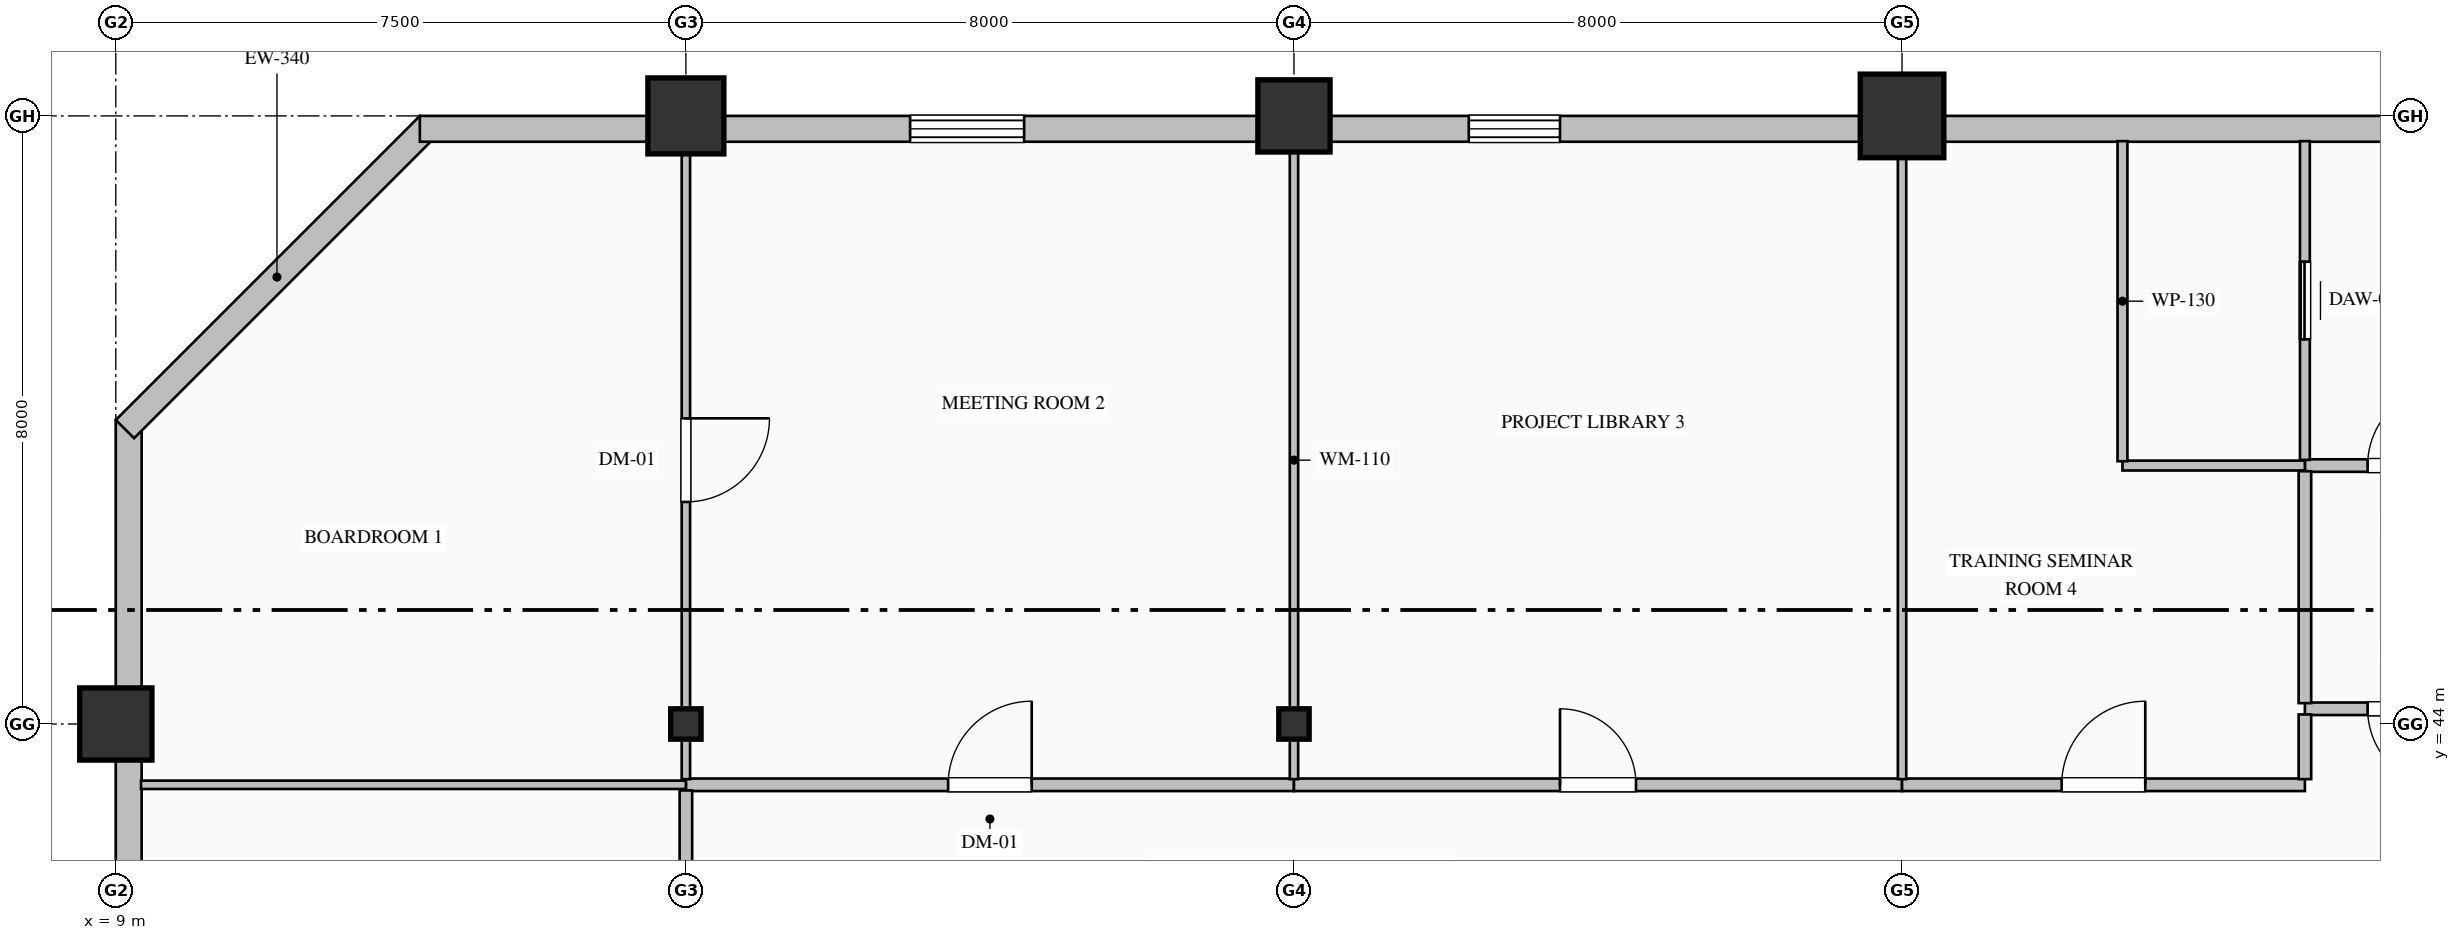
"""IFC4 building model, lengths in metres.
Left out: names, types, materials, properties, quantities, classifications, styles, units other than length and angle.
Written with IfcOpenShell. Run it as: python <this file> out.ifc"""

import sys

from ifc_helpers import new_model, si_unit, direction, frame, frame_2d, origin, origin_2d, place, context, subcontext, project, spatial, rectangle, hollow_rectangle, hollow_circle, i_section, extrude, element, fill, save


model = new_model("IFC4")
c1 = context("Model", 3, precision=1e-05, world=origin(), true_north=direction((0.0, 1.0)))
c2 = subcontext(c1, "Body", "Model", "MODEL_VIEW")
j1 = project(units=[si_unit("LENGTHUNIT", "METRE"), si_unit("PLANEANGLEUNIT", "RADIAN")], contexts=[c1])
p1 = place(None, origin())
s1 = spatial("IfcSite", under=j1, at=p1, CompositionType="ELEMENT")
p2 = place(p1, origin())
s2 = spatial("IfcBuilding", under=s1, at=p2, CompositionType="ELEMENT")
p3 = place(p2, frame((0.0, 0.0, 139.0)))
s3 = spatial("IfcBuildingStorey", under=s2, at=p3, CompositionType="ELEMENT", Elevation=139.0)
p4 = place(p3, frame((9.0, 44.0, 0.0), z_axis=(0.0, 0.0, 1.0), x_axis=(1.0, 0.0, 0.0)))
e1 = element("IfcColumn", 1, at=p4, inside=s3, PredefinedType="COLUMN", context=c2, shape_type="SweptSolid", body=[
    extrude(hollow_rectangle(XDim=0.95, YDim=0.95, WallThickness=0.036, at=origin_2d()), origin(), (0.0, 0.0, 1.0), 4.0),
])
p5 = place(p3, frame((16.5, 44.0, 0.0), z_axis=(0.0, 0.0, 1.0), x_axis=(1.0, 0.0, 0.0)))
e2 = element("IfcColumn", 2, at=p5, inside=s3, PredefinedType="COLUMN", context=c2, shape_type="SweptSolid", body=[
    extrude(i_section(OverallWidth=0.4, OverallDepth=0.4, WebThickness=0.013, FlangeThickness=0.021, FilletRadius=0.022, at=origin_2d()), origin(), (0.0, 0.0, 1.0), 4.0),
])
p6 = place(p3, frame((16.5, 52.0, 0.0), z_axis=(0.0, 0.0, 1.0), x_axis=(1.0, 0.0, 0.0)))
e3 = element("IfcColumn", 3, at=p6, inside=s3, PredefinedType="COLUMN", context=c2, shape_type="SweptSolid", body=[
    extrude(hollow_circle(Radius=0.5, WallThickness=0.036, at=origin_2d()), origin(), (0.0, 0.0, 1.0), 4.0),
])
p7 = place(p3, frame((24.5, 44.0, 0.0), z_axis=(0.0, 0.0, 1.0), x_axis=(1.0, 0.0, 0.0)))
e4 = element("IfcColumn", 4, at=p7, inside=s3, PredefinedType="COLUMN", context=c2, shape_type="SweptSolid", body=[
    extrude(i_section(OverallWidth=0.4, OverallDepth=0.4, WebThickness=0.013, FlangeThickness=0.021, FilletRadius=0.022, at=origin_2d()), origin(), (0.0, 0.0, 1.0), 4.0),
])
p8 = place(p3, frame((24.5, 52.0, 0.0), z_axis=(0.0, 0.0, 1.0), x_axis=(1.0, 0.0, 0.0)))
e5 = element("IfcColumn", 5, at=p8, inside=s3, PredefinedType="COLUMN", context=c2, shape_type="SweptSolid", body=[
    extrude(hollow_rectangle(XDim=0.95, YDim=0.95, WallThickness=0.036, at=origin_2d()), origin(), (0.0, 0.0, 1.0), 4.0),
])
p9 = place(p3, frame((32.5, 52.0, 0.0), z_axis=(0.0, 0.0, 1.0), x_axis=(1.0, 0.0, 0.0)))
e6 = element("IfcColumn", 6, at=p9, inside=s3, PredefinedType="COLUMN", context=c2, shape_type="SweptSolid", body=[
    extrude(hollow_rectangle(XDim=1.1, YDim=1.1, WallThickness=0.04, at=origin_2d()), origin(), (0.0, 0.0, 1.0), 4.0),
])
p10 = place(p3, frame((9.17, 32.0, 0.0), z_axis=(0.0, 0.0, 1.0), x_axis=(0.0, 1.0, 0.0)))
e7 = element("IfcWall", 7, at=p10, inside=s3, PredefinedType="SOLIDWALL", context=c2, shape_type="SweptSolid", body=[
    extrude(rectangle(XDim=16.0, YDim=0.34, at=frame_2d((8.0, 0.0))), origin(), (0.0, 0.0, 1.0), 3.265),
])
p11 = place(p10, frame((6.375, 0.0, 0.85)))
e8 = element("IfcOpeningElement", 8, at=p11, cuts=e7, PredefinedType="OPENING", context=c2, shape_type="SweptSolid", body=[
    extrude(rectangle(XDim=1.65, YDim=1.95, at=frame_2d((0.825, 0.975))), frame((0.0, 0.18, 0.0), z_axis=(0.0, -1.0, 0.0), x_axis=(1.0, 0.0, 0.0)), (0.0, 0.0, 1.0), 0.36),
])
p12 = place(p3, frame((9.12, 47.88, 0.0), z_axis=(0.0, 0.0, 1.0), x_axis=(0.707106781187, 0.707106781187, 0.0)))
e9 = element("IfcWall", 9, at=p12, inside=s3, PredefinedType="SOLIDWALL", context=c2, shape_type="SweptSolid", body=[
    extrude(rectangle(XDim=5.657, YDim=0.34, at=frame_2d((2.828, 0.0))), origin(), (0.0, 0.0, 1.0), 3.765),
])
p13 = place(p3, frame((13.0, 51.83, 0.0), z_axis=(0.0, 0.0, 1.0), x_axis=(1.0, 0.0, 0.0)))
e10 = element("IfcWall", 10, at=p13, inside=s3, PredefinedType="SOLIDWALL", context=c2, shape_type="SweptSolid", body=[
    extrude(rectangle(XDim=27.52, YDim=0.34, at=frame_2d((13.76, 0.0))), origin(), (0.0, 0.0, 1.0), 3.265),
])
p14 = place(p13, frame((6.45, 0.0, 0.85)))
e11 = element("IfcOpeningElement", 11, at=p14, cuts=e10, PredefinedType="OPENING", context=c2, shape_type="SweptSolid", body=[
    extrude(rectangle(XDim=1.5, YDim=1.95, at=frame_2d((0.75, 0.975))), frame((0.0, 0.18, 0.0), z_axis=(0.0, -1.0, 0.0), x_axis=(1.0, 0.0, 0.0)), (0.0, 0.0, 1.0), 0.36),
])
p15 = place(p13, frame((13.8, 0.0, 0.7)))
e12 = element("IfcOpeningElement", 12, at=p15, cuts=e10, PredefinedType="OPENING", context=c2, shape_type="SweptSolid", body=[
    extrude(rectangle(XDim=1.2, YDim=1.85, at=frame_2d((0.6, 0.925))), frame((0.0, 0.18, 0.0), z_axis=(0.0, -1.0, 0.0), x_axis=(1.0, 0.0, 0.0)), (0.0, 0.0, 1.0), 0.36),
])
p16 = place(p3, frame((37.8, 47.4, 0.0), z_axis=(0.0, 0.0, 1.0), x_axis=(1.0, 0.0, 0.0)))
e13 = element("IfcWall", 13, at=p16, inside=s3, PredefinedType="PARTITIONING", context=c2, shape_type="SweptSolid", body=[
    extrude(rectangle(XDim=2.7, YDim=0.165, at=frame_2d((1.35, 0.0))), origin(), (0.0, 0.0, 1.0), 3.765),
])
p17 = place(p16, frame((0.825, 0.0, 0.0)))
e14 = element("IfcOpeningElement", 14, at=p17, cuts=e13, PredefinedType="OPENING", context=c2, shape_type="SweptSolid", body=[
    extrude(rectangle(XDim=1.05, YDim=2.15, at=frame_2d((0.525, 1.075))), frame((0.0, 0.093, 0.0), z_axis=(0.0, -1.0, 0.0), x_axis=(1.0, 0.0, 0.0)), (0.0, 0.0, 1.0), 0.185),
])
p18 = place(p3, frame((40.5, 44.2, 0.0), z_axis=(0.0, 0.0, 1.0), x_axis=(-1.0, 0.0, 0.0)))
e15 = element("IfcWall", 15, at=p18, inside=s3, PredefinedType="PARTITIONING", context=c2, shape_type="SweptSolid", body=[
    extrude(rectangle(XDim=2.7, YDim=0.165, at=frame_2d((1.35, 0.0))), origin(), (0.0, 0.0, 1.0), 3.765),
])
p19 = place(p18, frame((0.825, 0.0, 0.0)))
e16 = element("IfcOpeningElement", 16, at=p19, cuts=e15, PredefinedType="OPENING", context=c2, shape_type="SweptSolid", body=[
    extrude(rectangle(XDim=1.05, YDim=2.15, at=frame_2d((0.525, 1.075))), frame((0.0, 0.093, 0.0), z_axis=(0.0, -1.0, 0.0), x_axis=(1.0, 0.0, 0.0)), (0.0, 0.0, 1.0), 0.185),
])
p20 = place(p3, frame((37.8, 44.274, 0.0), z_axis=(0.0, 0.0, 1.0), x_axis=(0.0, 1.0, 0.0)))
e17 = element("IfcWall", 17, at=p20, inside=s3, PredefinedType="PARTITIONING", context=c2, shape_type="SweptSolid", body=[
    extrude(rectangle(XDim=3.051, YDim=0.165, at=frame_2d((1.525, 0.0))), origin(), (0.0, 0.0, 1.0), 3.765),
])
p21 = place(p3, frame((37.8, 47.475, 0.0), z_axis=(0.0, 0.0, 1.0), x_axis=(0.0, 1.0, 0.0)))
e18 = element("IfcWall", 18, at=p21, inside=s3, PredefinedType="PARTITIONING", context=c2, shape_type="SweptSolid", body=[
    extrude(rectangle(XDim=4.193, YDim=0.13, at=frame_2d((2.097, 0.0))), origin(), (0.0, 0.0, 1.0), 3.765),
])
p22 = place(p21, frame((1.587, 0.0, 0.0)))
e19 = element("IfcOpeningElement", 19, at=p22, cuts=e18, PredefinedType="OPENING", context=c2, shape_type="SweptSolid", body=[
    extrude(rectangle(XDim=1.02, YDim=2.15, at=frame_2d((0.51, 1.075))), frame((0.0, 0.075, 0.0), z_axis=(0.0, -1.0, 0.0), x_axis=(1.0, 0.0, 0.0)), (0.0, 0.0, 1.0), 0.15),
])
p23 = place(p3, frame((37.8, 47.4, 0.0), z_axis=(0.0, 0.0, 1.0), x_axis=(-1.0, 0.0, 0.0)))
e20 = element("IfcWall", 20, at=p23, inside=s3, PredefinedType="PARTITIONING", context=c2, shape_type="SweptSolid", body=[
    extrude(rectangle(XDim=2.4, YDim=0.13, at=frame_2d((1.2, 0.0))), origin(), (0.0, 0.0, 1.0), 3.765),
])
p24 = place(p3, frame((35.4, 47.457, 0.0), z_axis=(0.0, 0.0, 1.0), x_axis=(0.0, 1.0, 0.0)))
e21 = element("IfcWall", 21, at=p24, inside=s3, PredefinedType="PARTITIONING", context=c2, shape_type="SweptSolid", body=[
    extrude(rectangle(XDim=4.211, YDim=0.13, at=frame_2d((2.105, 0.0))), origin(), (0.0, 0.0, 1.0), 3.765),
])
p25 = place(p3, frame((16.5, 43.2, 0.0), z_axis=(0.0, 0.0, 1.0), x_axis=(1.0, 0.0, 0.0)))
e22 = element("IfcWall", 22, at=p25, inside=s3, PredefinedType="PARTITIONING", context=c2, shape_type="SweptSolid", body=[
    extrude(rectangle(XDim=8.0, YDim=0.165, at=frame_2d((4.0, 0.0))), origin(), (0.0, 0.0, 1.0), 3.765),
])
p26 = place(p25, frame((3.45, 0.0, 0.0)))
e23 = element("IfcOpeningElement", 23, at=p26, cuts=e22, PredefinedType="OPENING", context=c2, shape_type="SweptSolid", body=[
    extrude(rectangle(XDim=1.1, YDim=2.2, at=frame_2d((0.55, 1.1))), frame((0.0, 0.093, 0.0), z_axis=(0.0, -1.0, 0.0), x_axis=(1.0, 0.0, 0.0)), (0.0, 0.0, 1.0), 0.185),
])
p27 = place(p3, frame((24.5, 43.2, 0.0), z_axis=(0.0, 0.0, 1.0), x_axis=(1.0, 0.0, 0.0)))
e24 = element("IfcWall", 24, at=p27, inside=s3, PredefinedType="PARTITIONING", context=c2, shape_type="SweptSolid", body=[
    extrude(rectangle(XDim=8.0, YDim=0.165, at=frame_2d((4.0, 0.0))), origin(), (0.0, 0.0, 1.0), 3.765),
])
p28 = place(p27, frame((3.5, 0.0, 0.0)))
e25 = element("IfcOpeningElement", 25, at=p28, cuts=e24, PredefinedType="OPENING", context=c2, shape_type="SweptSolid", body=[
    extrude(rectangle(XDim=1.0, YDim=2.15, at=frame_2d((0.5, 1.075))), frame((0.0, 0.093, 0.0), z_axis=(0.0, -1.0, 0.0), x_axis=(1.0, 0.0, 0.0)), (0.0, 0.0, 1.0), 0.185),
])
p29 = place(p3, frame((32.5, 43.2, 0.0), z_axis=(0.0, 0.0, 1.0), x_axis=(1.0, 0.0, 0.0)))
e26 = element("IfcWall", 26, at=p29, inside=s3, PredefinedType="PARTITIONING", context=c2, shape_type="SweptSolid", body=[
    extrude(rectangle(XDim=5.3, YDim=0.165, at=frame_2d((2.65, 0.0))), origin(), (0.0, 0.0, 1.0), 3.765),
])
p30 = place(p29, frame((2.1, 0.0, 0.0)))
e27 = element("IfcOpeningElement", 27, at=p30, cuts=e26, PredefinedType="OPENING", context=c2, shape_type="SweptSolid", body=[
    extrude(rectangle(XDim=1.1, YDim=2.2, at=frame_2d((0.55, 1.1))), frame((0.0, 0.093, 0.0), z_axis=(0.0, -1.0, 0.0), x_axis=(1.0, 0.0, 0.0)), (0.0, 0.0, 1.0), 0.185),
])
p31 = place(p3, frame((16.5, 41.0, 0.0), z_axis=(0.0, 0.0, 1.0), x_axis=(0.0, 1.0, 0.0)))
e28 = element("IfcWall", 28, at=p31, inside=s3, PredefinedType="PARTITIONING", context=c2, shape_type="SweptSolid", body=[
    extrude(rectangle(XDim=2.125, YDim=0.165, at=frame_2d((1.063, 0.0))), origin(), (0.0, 0.0, 1.0), 3.157),
])
p32 = place(p3, frame((37.8, 43.274, 0.0), z_axis=(0.0, 0.0, 1.0), x_axis=(0.0, 1.0, 0.0)))
e29 = element("IfcWall", 29, at=p32, inside=s3, PredefinedType="PARTITIONING", context=c2, shape_type="SweptSolid", body=[
    extrude(rectangle(XDim=0.851, YDim=0.165, at=frame_2d((0.426, 0.0))), origin(), (0.0, 0.0, 1.0), 3.765),
])
p33 = place(p3, frame((16.5, 51.668, 0.0), z_axis=(0.0, 0.0, 1.0), x_axis=(0.0, -1.0, 0.0)))
e30 = element("IfcWall", 30, at=p33, inside=s3, PredefinedType="MOVABLE", context=c2, shape_type="SweptSolid", body=[
    extrude(rectangle(XDim=8.394, YDim=0.11, at=frame_2d((4.197, 0.0))), origin(), (0.0, 0.0, 1.0), 3.157),
])
p34 = place(p33, frame((3.647, 0.0, 0.0)))
e31 = element("IfcOpeningElement", 31, at=p34, cuts=e30, PredefinedType="OPENING", context=c2, shape_type="SweptSolid", body=[
    extrude(rectangle(XDim=1.1, YDim=2.2, at=frame_2d((0.55, 1.1))), frame((0.0, 0.065, 0.0), z_axis=(0.0, -1.0, 0.0), x_axis=(1.0, 0.0, 0.0)), (0.0, 0.0, 1.0), 0.13),
])
p35 = place(p3, frame((16.5, 43.2, 0.0), z_axis=(0.0, 0.0, 1.0), x_axis=(-1.0, 0.0, 0.0)))
e32 = element("IfcWall", 32, at=p35, inside=s3, PredefinedType="MOVABLE", context=c2, shape_type="SweptSolid", body=[
    extrude(rectangle(XDim=7.168, YDim=0.11, at=frame_2d((3.584, 0.0))), origin(), (0.0, 0.0, 1.0), 3.765),
])
p36 = place(p3, frame((24.5, 51.668, 0.0), z_axis=(0.0, 0.0, 1.0), x_axis=(0.0, -1.0, 0.0)))
e33 = element("IfcWall", 33, at=p36, inside=s3, PredefinedType="MOVABLE", context=c2, shape_type="SweptSolid", body=[
    extrude(rectangle(XDim=8.394, YDim=0.11, at=frame_2d((4.197, 0.0))), origin(), (0.0, 0.0, 1.0), 3.157),
])
p37 = place(p3, frame((32.5, 51.668, 0.0), z_axis=(0.0, 0.0, 1.0), x_axis=(0.0, -1.0, 0.0)))
e34 = element("IfcWall", 34, at=p37, inside=s3, PredefinedType="MOVABLE", context=c2, shape_type="SweptSolid", body=[
    extrude(rectangle(XDim=8.394, YDim=0.11, at=frame_2d((4.197, 0.0))), origin(), (0.0, 0.0, 1.0), 3.765),
])
p38 = place(p14, origin())
e35 = element("IfcWindow", 35, at=p38, inside=s3, PartitioningType="DOUBLE_PANEL_VERTICAL", PredefinedType="WINDOW", context=c2, shape_type="SweptSolid", body=[
    extrude(rectangle(XDim=1.5, YDim=1.95, at=frame_2d((0.75, 0.975))), frame((0.0, 0.15, 0.0), z_axis=(0.0, -1.0, 0.0), x_axis=(1.0, 0.0, 0.0)), (0.0, 0.0, 1.0), 0.06),
])
fill(e11, e35)
p39 = place(p15, origin())
e36 = element("IfcWindow", 36, at=p39, inside=s3, PartitioningType="DOUBLE_PANEL_VERTICAL", PredefinedType="WINDOW", context=c2, shape_type="SweptSolid", body=[
    extrude(rectangle(XDim=1.2, YDim=1.85, at=frame_2d((0.6, 0.925))), frame((0.0, 0.15, 0.0), z_axis=(0.0, -1.0, 0.0), x_axis=(1.0, 0.0, 0.0)), (0.0, 0.0, 1.0), 0.06),
])
fill(e12, e36)
p40 = place(p17, origin())
e37 = element("IfcDoor", 37, at=p40, inside=s3, OperationType="SINGLE_SWING_RIGHT", PredefinedType="DOOR", context=c2, shape_type="SweptSolid", body=[
    extrude(rectangle(XDim=1.05, YDim=2.15, at=frame_2d((0.525, 1.075))), frame((0.0, 0.025, 0.0), z_axis=(0.0, -1.0, 0.0), x_axis=(1.0, 0.0, 0.0)), (0.0, 0.0, 1.0), 0.05),
])
fill(e14, e37)
p41 = place(p19, origin())
e38 = element("IfcDoor", 38, at=p41, inside=s3, OperationType="SINGLE_SWING_LEFT", PredefinedType="DOOR", context=c2, shape_type="SweptSolid", body=[
    extrude(rectangle(XDim=1.05, YDim=2.15, at=frame_2d((0.525, 1.075))), frame((0.0, 0.025, 0.0), z_axis=(0.0, -1.0, 0.0), x_axis=(1.0, 0.0, 0.0)), (0.0, 0.0, 1.0), 0.05),
])
fill(e16, e38)
p42 = place(p22, origin())
e39 = element("IfcDoor", 39, at=p42, inside=s3, OperationType="SLIDING_TO_LEFT", PredefinedType="DOOR", context=c2, shape_type="SweptSolid", body=[
    extrude(rectangle(XDim=1.02, YDim=2.15, at=frame_2d((0.51, 1.075))), frame((0.0, 0.025, 0.0), z_axis=(0.0, -1.0, 0.0), x_axis=(1.0, 0.0, 0.0)), (0.0, 0.0, 1.0), 0.05),
])
fill(e19, e39)
p43 = place(p34, origin())
e40 = element("IfcDoor", 40, at=p43, inside=s3, OperationType="SINGLE_SWING_LEFT", PredefinedType="DOOR", context=c2, shape_type="SweptSolid", body=[
    extrude(rectangle(XDim=1.1, YDim=2.2, at=frame_2d((0.55, 1.1))), frame((0.0, 0.025, 0.0), z_axis=(0.0, -1.0, 0.0), x_axis=(1.0, 0.0, 0.0)), (0.0, 0.0, 1.0), 0.05),
])
fill(e31, e40)
p44 = place(p26, origin())
e41 = element("IfcDoor", 41, at=p44, inside=s3, OperationType="SINGLE_SWING_RIGHT", PredefinedType="DOOR", context=c2, shape_type="SweptSolid", body=[
    extrude(rectangle(XDim=1.1, YDim=2.2, at=frame_2d((0.55, 1.1))), frame((0.0, 0.025, 0.0), z_axis=(0.0, -1.0, 0.0), x_axis=(1.0, 0.0, 0.0)), (0.0, 0.0, 1.0), 0.05),
])
fill(e23, e41)
p45 = place(p28, origin())
e42 = element("IfcDoor", 42, at=p45, inside=s3, OperationType="SINGLE_SWING_LEFT", PredefinedType="DOOR", context=c2, shape_type="SweptSolid", body=[
    extrude(rectangle(XDim=1.0, YDim=2.15, at=frame_2d((0.5, 1.075))), frame((0.0, 0.025, 0.0), z_axis=(0.0, -1.0, 0.0), x_axis=(1.0, 0.0, 0.0)), (0.0, 0.0, 1.0), 0.05),
])
fill(e25, e42)
p46 = place(p30, origin())
e43 = element("IfcDoor", 43, at=p46, inside=s3, OperationType="SINGLE_SWING_RIGHT", PredefinedType="DOOR", context=c2, shape_type="SweptSolid", body=[
    extrude(rectangle(XDim=1.1, YDim=2.2, at=frame_2d((0.55, 1.1))), frame((0.0, 0.025, 0.0), z_axis=(0.0, -1.0, 0.0), x_axis=(1.0, 0.0, 0.0)), (0.0, 0.0, 1.0), 0.05),
])
fill(e27, e43)
save(model, sys.argv[1])
